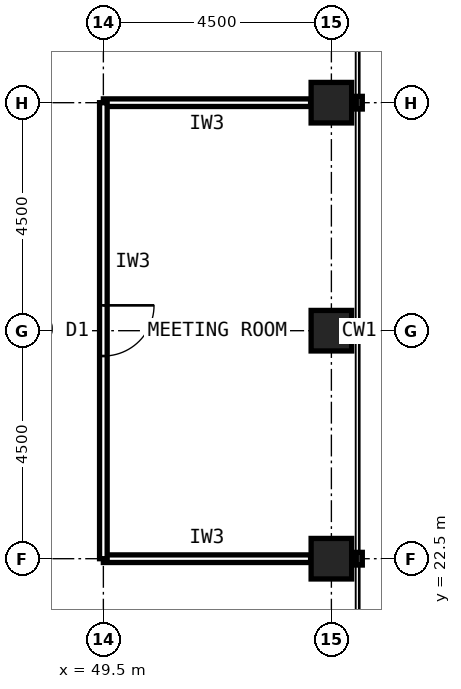
"""IFC4 building model, lengths in metres.
Left out: names, types, materials, properties, quantities, classifications, styles, units other than length and angle.
Written with IfcOpenShell. Run it as: python <this file> out.ifc"""

import sys

from ifc_helpers import new_model, si_unit, direction, frame, frame_2d, origin, origin_2d, place, context, subcontext, project, spatial, rectangle, hollow_rectangle, extrude, element, fill, save


model = new_model("IFC4")
c1 = context("Model", 3, precision=1e-05, world=origin(), true_north=direction((0.0, 1.0)))
c2 = subcontext(c1, "Body", "Model", "MODEL_VIEW")
j1 = project(units=[si_unit("LENGTHUNIT", "METRE"), si_unit("PLANEANGLEUNIT", "RADIAN")], contexts=[c1])
p1 = place(None, origin())
s1 = spatial("IfcSite", under=j1, at=p1, CompositionType="ELEMENT")
p2 = place(p1, origin())
s2 = spatial("IfcBuilding", under=s1, at=p2, CompositionType="ELEMENT")
p3 = place(p2, frame((0.0, 0.0, 54.2)))
s3 = spatial("IfcBuildingStorey", under=s2, at=p3, CompositionType="ELEMENT", Elevation=54.2)
for number, where, z_axis, x_axis in (
    (1, (54.0, 22.5, 0.0), (0.0, 0.0, 1.0), (1.0, 0.0, 0.0)),
    (2, (54.0, 27.0, 0.0), (0.0, 0.0, 1.0), (1.0, 0.0, 0.0)),
    (3, (54.0, 31.5, 0.0), (0.0, 0.0, 1.0), (1.0, 0.0, 0.0)),
):
    element("IfcColumn", number, at=place(p3, frame(where, z_axis=z_axis, x_axis=x_axis)), inside=s3, PredefinedType="COLUMN", context=c2, shape_type="SweptSolid", body=[
        extrude(hollow_rectangle(XDim=0.8, YDim=0.8, WallThickness=0.045, at=origin_2d()), origin(), (0.0, 0.0, 1.0), 4.2),
    ])
for number, where, z_axis, x_axis in (
    (4, (49.5, 22.5, 0.0), (0.0, 0.0, 1.0), (1.0, 0.0, 0.0)),
    (5, (53.59, 31.5, 0.0), (0.0, 0.0, 1.0), (-1.0, 0.0, 0.0)),
):
    element("IfcWall", number, at=place(p3, frame(where, z_axis=z_axis, x_axis=x_axis)), inside=s3, PredefinedType="PARTITIONING", context=c2, shape_type="SweptSolid", body=[
        extrude(rectangle(XDim=4.09, YDim=0.15, at=frame_2d((2.045, 0.0))), origin(), (0.0, 0.0, 1.0), 3.189),
    ])
p4 = place(p3, frame((49.5, 31.5, 0.0), z_axis=(0.0, 0.0, 1.0), x_axis=(0.0, -1.0, 0.0)))
e6 = element("IfcWall", 6, at=p4, inside=s3, PredefinedType="PARTITIONING", context=c2, shape_type="SweptSolid", body=[
    extrude(rectangle(XDim=9.0, YDim=0.15, at=frame_2d((4.5, 0.0))), origin(), (0.0, 0.0, 1.0), 4.04),
])
p5 = place(p4, frame((4.0, 0.0, 0.0)))
e7 = element("IfcOpeningElement", 7, at=p5, cuts=e6, PredefinedType="OPENING", context=c2, shape_type="SweptSolid", body=[
    extrude(rectangle(XDim=1.0, YDim=2.1, at=frame_2d((0.5, 1.05))), frame((0.0, 0.085, 0.0), z_axis=(0.0, -1.0, 0.0), x_axis=(1.0, 0.0, 0.0)), (0.0, 0.0, 1.0), 0.17),
])
p6 = place(p5, origin())
e8 = element("IfcDoor", 8, at=p6, inside=s3, OperationType="SINGLE_SWING_LEFT", PredefinedType="DOOR", context=c2, shape_type="SweptSolid", body=[
    extrude(rectangle(XDim=1.0, YDim=2.1, at=frame_2d((0.5, 1.05))), frame((0.0, 0.025, 0.0), z_axis=(0.0, -1.0, 0.0), x_axis=(1.0, 0.0, 0.0)), (0.0, 0.0, 1.0), 0.05),
])
fill(e7, e8)
save(model, sys.argv[1])
